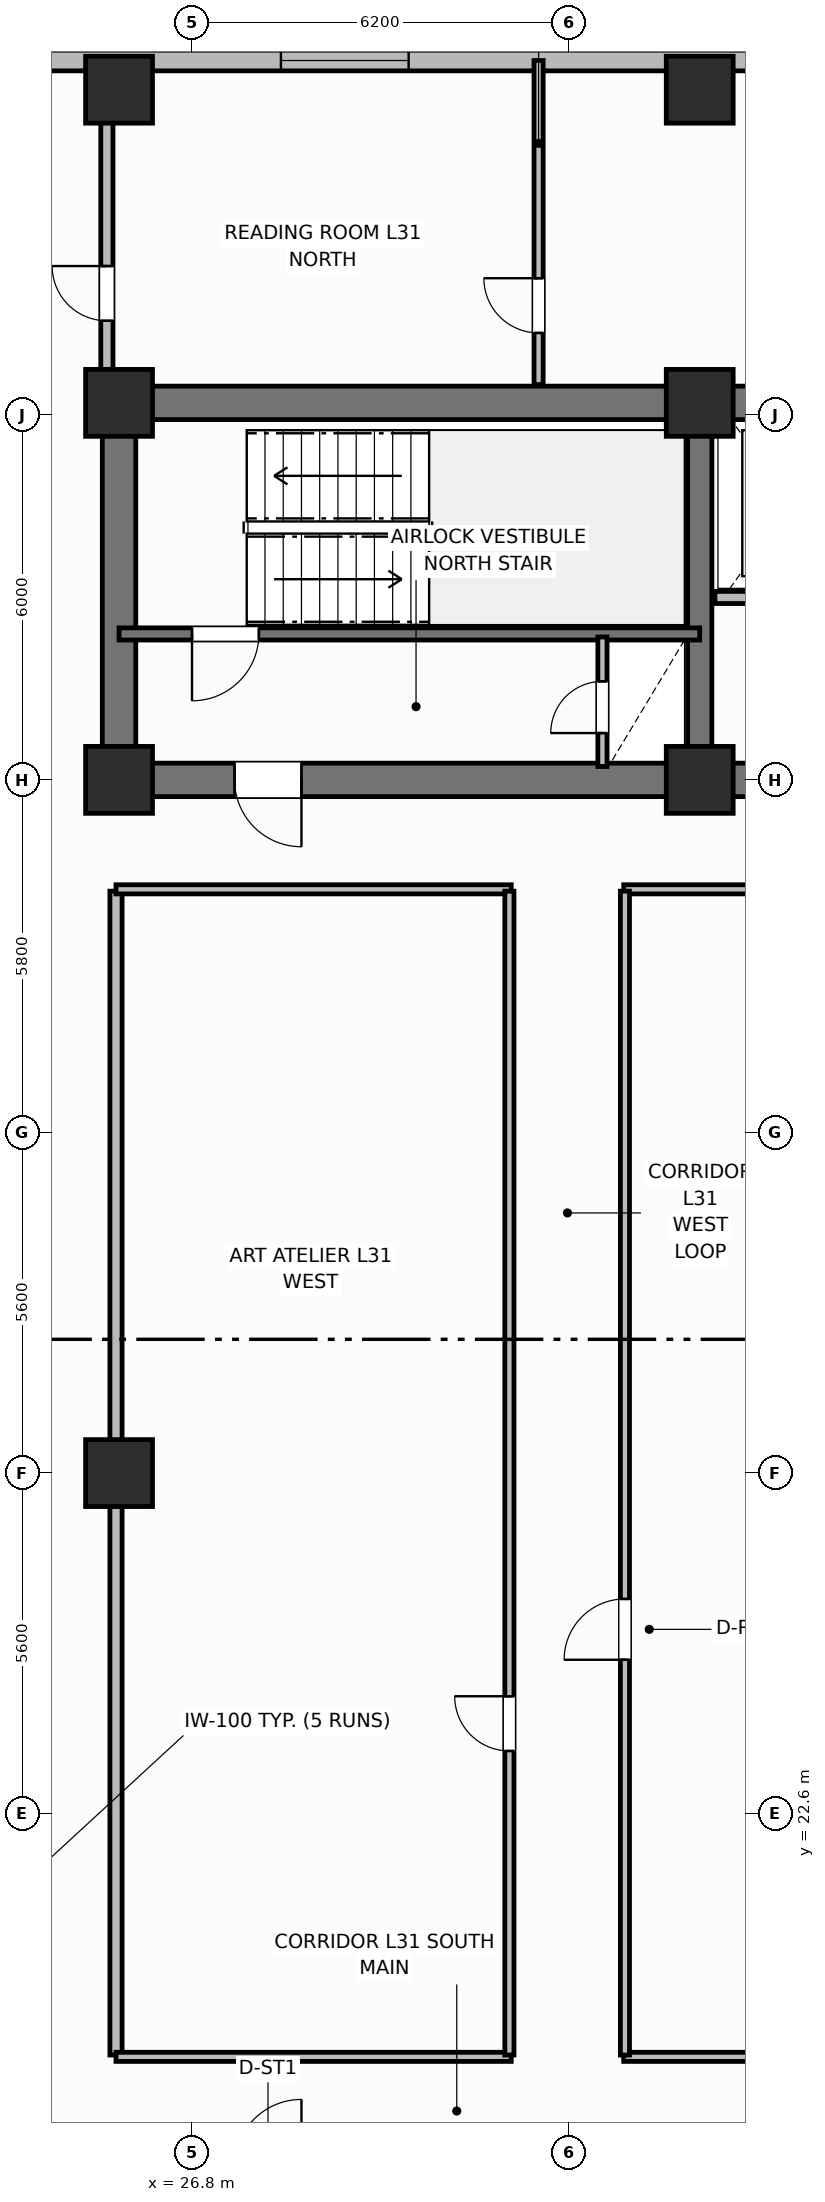
"""IFC4 building model, lengths in metres.
Left out: names, types, materials, properties, quantities, classifications, styles, units other than length and angle.
Written with IfcOpenShell. Run it as: python <this file> out.ifc"""

import sys

from ifc_helpers import new_model, si_unit, direction, frame, frame_2d, origin, origin_2d, place, context, subcontext, project, spatial, rectangle, extrude, element, fill, save


model = new_model("IFC4")
c1 = context("Model", 3, precision=1e-05, world=origin(), true_north=direction((0.0, 1.0)))
c2 = subcontext(c1, "Body", "Model", "MODEL_VIEW")
j1 = project(units=[si_unit("LENGTHUNIT", "METRE"), si_unit("PLANEANGLEUNIT", "RADIAN")], contexts=[c1])
p1 = place(None, origin())
s1 = spatial("IfcSite", under=j1, at=p1, CompositionType="ELEMENT")
p2 = place(p1, origin())
s2 = spatial("IfcBuilding", under=s1, at=p2, CompositionType="ELEMENT")
p3 = place(p2, frame((0.0, 0.0, 125.3)))
s3 = spatial("IfcBuildingStorey", under=s2, at=p3, CompositionType="ELEMENT", Elevation=125.3)
p4 = place(p3, frame((25.6, 45.8, 0.0), z_axis=(0.0, 0.0, 1.0), x_axis=(1.0, 0.0, 0.0)))
e1 = element("IfcWall", 1, at=p4, inside=s3, PredefinedType="SHEAR", context=c2, shape_type="SweptSolid", body=[
    extrude(rectangle(XDim=27.2, YDim=0.55, at=frame_2d((13.6, 0.0))), origin(), (0.0, 0.0, 1.0), 3.7),
])
p5 = place(p3, frame((25.6, 39.875, 0.0), z_axis=(0.0, 0.0, 1.0), x_axis=(0.0, 1.0, 0.0)))
e2 = element("IfcWall", 2, at=p5, inside=s3, PredefinedType="SHEAR", context=c2, shape_type="SweptSolid", body=[
    extrude(rectangle(XDim=5.65, YDim=0.55, at=frame_2d((2.825, 0.0))), origin(), (0.0, 0.0, 1.0), 3.7),
])
p6 = place(p3, frame((52.8, 39.6, 0.0), z_axis=(0.0, 0.0, 1.0), x_axis=(-1.0, 0.0, 0.0)))
e3 = element("IfcWall", 3, at=p6, inside=s3, PredefinedType="SHEAR", context=c2, shape_type="SweptSolid", body=[
    extrude(rectangle(XDim=27.2, YDim=0.55, at=frame_2d((13.6, 0.0))), origin(), (0.0, 0.0, 1.0), 3.7),
])
p7 = place(p6, frame((24.2, 0.0, 0.0)))
e4 = element("IfcOpeningElement", 4, at=p7, cuts=e3, PredefinedType="OPENING", context=c2, shape_type="SweptSolid", body=[
    extrude(rectangle(XDim=1.1, YDim=2.15, at=frame_2d((0.55, 1.075))), frame((0.0, 0.285, 0.0), z_axis=(0.0, -1.0, 0.0), x_axis=(1.0, 0.0, 0.0)), (0.0, 0.0, 1.0), 0.57),
])
p8 = place(p6, frame((15.1, 0.0, 0.0)))
e5 = element("IfcOpeningElement", 5, at=p8, cuts=e3, PredefinedType="OPENING", context=c2, shape_type="SweptSolid", body=[
    extrude(rectangle(XDim=1.2, YDim=2.15, at=frame_2d((0.6, 1.075))), frame((0.0, 0.285, 0.0), z_axis=(0.0, -1.0, 0.0), x_axis=(1.0, 0.0, 0.0)), (0.0, 0.0, 1.0), 0.57),
])
p9 = place(p6, frame((11.3, 0.0, 0.0)))
e6 = element("IfcOpeningElement", 6, at=p9, cuts=e3, PredefinedType="OPENING", context=c2, shape_type="SweptSolid", body=[
    extrude(rectangle(XDim=1.3, YDim=2.2, at=frame_2d((0.65, 1.1))), frame((0.0, 0.285, 0.0), z_axis=(0.0, -1.0, 0.0), x_axis=(1.0, 0.0, 0.0)), (0.0, 0.0, 1.0), 0.57),
])
p10 = place(p6, frame((7.25, 0.0, 0.0)))
e7 = element("IfcOpeningElement", 7, at=p10, cuts=e3, PredefinedType="OPENING", context=c2, shape_type="SweptSolid", body=[
    extrude(rectangle(XDim=0.85, YDim=2.1, at=frame_2d((0.425, 1.05))), frame((0.0, 0.285, 0.0), z_axis=(0.0, -1.0, 0.0), x_axis=(1.0, 0.0, 0.0)), (0.0, 0.0, 1.0), 0.57),
])
p11 = place(p6, frame((3.0, 0.0, 0.0)))
e8 = element("IfcOpeningElement", 8, at=p11, cuts=e3, PredefinedType="OPENING", context=c2, shape_type="SweptSolid", body=[
    extrude(rectangle(XDim=0.9, YDim=2.1, at=frame_2d((0.45, 1.05))), frame((0.0, 0.285, 0.0), z_axis=(0.0, -1.0, 0.0), x_axis=(1.0, 0.0, 0.0)), (0.0, 0.0, 1.0), 0.57),
])
p12 = place(p3, frame((35.15, 39.875, 0.0), z_axis=(0.0, 0.0, 1.0), x_axis=(0.0, 1.0, 0.0)))
e9 = element("IfcWall", 9, at=p12, inside=s3, PredefinedType="SHEAR", context=c2, shape_type="SweptSolid", body=[
    extrude(rectangle(XDim=5.65, YDim=0.4, at=frame_2d((2.825, 0.0))), origin(), (0.0, 0.0, 1.0), 3.7),
])
for number, where, z_axis, x_axis in (
    (10, (25.6, 39.6, 0.0), (0.0, 0.0, 1.0), (1.0, 0.0, 0.0)),
    (11, (25.6, 45.8, 0.0), (0.0, 0.0, 1.0), (1.0, 0.0, 0.0)),
    (12, (35.15, 39.6, 0.0), (0.0, 0.0, 1.0), (1.0, 0.0, 0.0)),
    (13, (35.15, 45.8, 0.0), (0.0, 0.0, 1.0), (1.0, 0.0, 0.0)),
    (14, (25.6, 28.2, 0.0), (0.0, 0.0, 1.0), (1.0, 0.0, 0.0)),
    (15, (25.6, 50.95, 0.0), (0.0, 0.0, 1.0), (1.0, 0.0, 0.0)),
    (16, (35.15, 50.95, 0.0), (0.0, 0.0, 1.0), (1.0, 0.0, 0.0)),
):
    element("IfcColumn", number, at=place(p3, frame(where, z_axis=z_axis, x_axis=x_axis)), inside=s3, PredefinedType="COLUMN", context=c2, shape_type="SweptSolid", body=[
        extrude(rectangle(XDim=1.1, YDim=1.1, at=origin_2d()), origin(), (0.0, 0.0, 1.0), 3.7),
    ])
p13 = place(p3, frame((36.0, 51.43, 0.0), z_axis=(0.0, 0.0, 1.0), x_axis=(-1.0, 0.0, 0.0)))
e17 = element("IfcWall", 17, at=p13, inside=s3, PredefinedType="SOLIDWALL", context=c2, shape_type="SweptSolid", body=[
    extrude(rectangle(XDim=17.4, YDim=0.34, at=frame_2d((8.7, 0.0))), origin(), (0.0, 0.0, 1.0), 2.7),
])
p14 = place(p13, frame((5.637, 0.0, 0.68)))
e18 = element("IfcOpeningElement", 18, at=p14, cuts=e17, PredefinedType="OPENING", context=c2, shape_type="SweptSolid", body=[
    extrude(rectangle(XDim=2.1, YDim=1.9, at=frame_2d((1.05, 0.95))), frame((0.0, 0.18, 0.0), z_axis=(0.0, -1.0, 0.0), x_axis=(1.0, 0.0, 0.0)), (0.0, 0.0, 1.0), 0.36),
])
p15 = place(p13, frame((13.688, 0.0, 0.68)))
e19 = element("IfcOpeningElement", 19, at=p15, cuts=e17, PredefinedType="OPENING", context=c2, shape_type="SweptSolid", body=[
    extrude(rectangle(XDim=2.1, YDim=1.9, at=frame_2d((1.05, 0.95))), frame((0.0, 0.18, 0.0), z_axis=(0.0, -1.0, 0.0), x_axis=(1.0, 0.0, 0.0)), (0.0, 0.0, 1.0), 0.36),
])
p16 = place(p3, frame((35.15, 42.0, 0.0), z_axis=(0.0, 0.0, 1.0), x_axis=(-1.0, 0.0, 0.0)))
e20 = element("IfcWall", 20, at=p16, inside=s3, PredefinedType="SHEAR", context=c2, shape_type="SweptSolid", body=[
    extrude(rectangle(XDim=9.55, YDim=0.2, at=frame_2d((4.775, 0.0))), origin(), (0.0, 0.0, 1.0), 3.7),
])
p17 = place(p16, frame((7.25, 0.0, 0.0)))
e21 = element("IfcOpeningElement", 21, at=p17, cuts=e20, PredefinedType="OPENING", context=c2, shape_type="SweptSolid", body=[
    extrude(rectangle(XDim=1.1, YDim=2.15, at=frame_2d((0.55, 1.075))), frame((0.0, 0.11, 0.0), z_axis=(0.0, -1.0, 0.0), x_axis=(1.0, 0.0, 0.0)), (0.0, 0.0, 1.0), 0.22),
])
p18 = place(p3, frame((33.55, 39.82, 0.0), z_axis=(0.0, 0.0, 1.0), x_axis=(0.0, 1.0, 0.0)))
e22 = element("IfcWall", 22, at=p18, inside=s3, PredefinedType="PARTITIONING", context=c2, shape_type="SweptSolid", body=[
    extrude(rectangle(XDim=2.13, YDim=0.15, at=frame_2d((1.065, 0.0))), origin(), (0.0, 0.0, 1.0), 2.53),
])
p19 = place(p18, frame((0.55, 0.0, 0.0)))
e23 = element("IfcOpeningElement", 23, at=p19, cuts=e22, PredefinedType="OPENING", context=c2, shape_type="SweptSolid", body=[
    extrude(rectangle(XDim=0.85, YDim=2.05, at=frame_2d((0.425, 1.025))), frame((0.0, 0.085, 0.0), z_axis=(0.0, -1.0, 0.0), x_axis=(1.0, 0.0, 0.0)), (0.0, 0.0, 1.0), 0.17),
])
p20 = place(p3, frame((37.95, 42.6, 0.0), z_axis=(0.0, 0.0, 1.0), x_axis=(-1.0, 0.0, 0.0)))
e24 = element("IfcWall", 24, at=p20, inside=s3, PredefinedType="PARTITIONING", context=c2, shape_type="SweptSolid", body=[
    extrude(rectangle(XDim=2.55, YDim=0.2, at=frame_2d((1.275, 0.0))), origin(), (0.0, 0.0, 1.0), 2.3),
])
p21 = place(p20, frame((0.75, 0.0, 0.0)))
e25 = element("IfcOpeningElement", 25, at=p21, cuts=e24, PredefinedType="OPENING", context=c2, shape_type="SweptSolid", body=[
    extrude(rectangle(XDim=1.1, YDim=2.15, at=frame_2d((0.55, 1.075))), frame((0.0, 0.11, 0.0), z_axis=(0.0, -1.0, 0.0), x_axis=(1.0, 0.0, 0.0)), (0.0, 0.0, 1.0), 0.22),
])
p22 = place(p3, frame((25.55, 18.63, 0.0), z_axis=(0.0, 0.0, 1.0), x_axis=(0.0, 1.0, 0.0)))
e26 = element("IfcWall", 26, at=p22, inside=s3, PredefinedType="PARTITIONING", context=c2, shape_type="SweptSolid", body=[
    extrude(rectangle(XDim=19.14, YDim=0.2, at=frame_2d((9.57, 0.0))), origin(), (0.0, 0.0, 1.0), 2.53),
])
for number, where, z_axis, x_axis in (
    (27, (25.55, 18.6, 0.0), (0.0, 0.0, 1.0), (1.0, 0.0, 0.0)),
    (28, (25.55, 37.8, 0.0), (0.0, 0.0, 1.0), (1.0, 0.0, 0.0)),
):
    element("IfcWall", number, at=place(p3, frame(where, z_axis=z_axis, x_axis=x_axis)), inside=s3, PredefinedType="PARTITIONING", context=c2, shape_type="SweptSolid", body=[
        extrude(rectangle(XDim=6.5, YDim=0.15, at=frame_2d((3.25, 0.0))), origin(), (0.0, 0.0, 1.0), 2.53),
    ])
for number, where, z_axis, x_axis in (
    (29, (33.9, 18.6, 0.0), (0.0, 0.0, 1.0), (1.0, 0.0, 0.0)),
    (30, (33.9, 37.8, 0.0), (0.0, 0.0, 1.0), (1.0, 0.0, 0.0)),
):
    element("IfcWall", number, at=place(p3, frame(where, z_axis=z_axis, x_axis=x_axis)), inside=s3, PredefinedType="PARTITIONING", context=c2, shape_type="SweptSolid", body=[
        extrude(rectangle(XDim=10.6, YDim=0.15, at=frame_2d((5.3, 0.0))), origin(), (0.0, 0.0, 1.0), 2.53),
    ])
p23 = place(p3, frame((32.02, 18.63, 0.0), z_axis=(0.0, 0.0, 1.0), x_axis=(0.0, 1.0, 0.0)))
e31 = element("IfcWall", 31, at=p23, inside=s3, PredefinedType="PARTITIONING", context=c2, shape_type="SweptSolid", body=[
    extrude(rectangle(XDim=19.14, YDim=0.15, at=frame_2d((9.57, 0.0))), origin(), (0.0, 0.0, 1.0), 2.53),
])
p24 = place(p23, frame((5.0, 0.0, 0.0)))
e32 = element("IfcOpeningElement", 32, at=p24, cuts=e31, PredefinedType="OPENING", context=c2, shape_type="SweptSolid", body=[
    extrude(rectangle(XDim=0.9, YDim=2.1, at=frame_2d((0.45, 1.05))), frame((0.0, 0.085, 0.0), z_axis=(0.0, -1.0, 0.0), x_axis=(1.0, 0.0, 0.0)), (0.0, 0.0, 1.0), 0.17),
])
p25 = place(p3, frame((33.92, 18.63, 0.0), z_axis=(0.0, 0.0, 1.0), x_axis=(0.0, 1.0, 0.0)))
e33 = element("IfcWall", 33, at=p25, inside=s3, PredefinedType="PARTITIONING", context=c2, shape_type="SweptSolid", body=[
    extrude(rectangle(XDim=19.14, YDim=0.15, at=frame_2d((9.57, 0.0))), origin(), (0.0, 0.0, 1.0), 2.53),
])
p26 = place(p25, frame((6.5, 0.0, 0.0)))
e34 = element("IfcOpeningElement", 34, at=p26, cuts=e33, PredefinedType="OPENING", context=c2, shape_type="SweptSolid", body=[
    extrude(rectangle(XDim=1.0, YDim=2.15, at=frame_2d((0.5, 1.075))), frame((0.0, 0.085, 0.0), z_axis=(0.0, -1.0, 0.0), x_axis=(1.0, 0.0, 0.0)), (0.0, 0.0, 1.0), 0.17),
])
p27 = place(p3, frame((32.5, 46.1, 0.0), z_axis=(0.0, 0.0, 1.0), x_axis=(0.0, 1.0, 0.0)))
e35 = element("IfcWall", 35, at=p27, inside=s3, PredefinedType="PARTITIONING", context=c2, shape_type="SweptSolid", body=[
    extrude(rectangle(XDim=5.33, YDim=0.15, at=frame_2d((2.665, 0.0))), origin(), (0.0, 0.0, 1.0), 2.53),
])
p28 = place(p27, frame((0.85, 0.0, 0.0)))
e36 = element("IfcOpeningElement", 36, at=p28, cuts=e35, PredefinedType="OPENING", context=c2, shape_type="SweptSolid", body=[
    extrude(rectangle(XDim=0.9, YDim=2.1, at=frame_2d((0.45, 1.05))), frame((0.0, 0.085, 0.0), z_axis=(0.0, -1.0, 0.0), x_axis=(1.0, 0.0, 0.0)), (0.0, 0.0, 1.0), 0.17),
])
p29 = place(p3, frame((25.4, 46.1, 0.0), z_axis=(0.0, 0.0, 1.0), x_axis=(0.0, 1.0, 0.0)))
e37 = element("IfcWall", 37, at=p29, inside=s3, PredefinedType="PARTITIONING", context=c2, shape_type="SweptSolid", body=[
    extrude(rectangle(XDim=4.53, YDim=0.2, at=frame_2d((2.265, 0.0))), origin(), (0.0, 0.0, 1.0), 2.53),
])
p30 = place(p29, frame((1.05, 0.0, 0.0)))
e38 = element("IfcOpeningElement", 38, at=p30, cuts=e37, PredefinedType="OPENING", context=c2, shape_type="SweptSolid", body=[
    extrude(rectangle(XDim=0.9, YDim=2.1, at=frame_2d((0.45, 1.05))), frame((0.0, 0.11, 0.0), z_axis=(0.0, -1.0, 0.0), x_axis=(1.0, 0.0, 0.0)), (0.0, 0.0, 1.0), 0.22),
])
p31 = place(p14, origin())
e39 = element("IfcWindow", 39, at=p31, inside=s3, PartitioningType="SINGLE_PANEL", PredefinedType="WINDOW", context=c2, shape_type="SweptSolid", body=[
    extrude(rectangle(XDim=2.1, YDim=1.9, at=frame_2d((1.05, 0.95))), frame((0.0, 0.03, 0.0), z_axis=(0.0, -1.0, 0.0), x_axis=(1.0, 0.0, 0.0)), (0.0, 0.0, 1.0), 0.06),
])
fill(e18, e39)
p32 = place(p17, origin())
e40 = element("IfcDoor", 40, at=p32, inside=s3, OperationType="SINGLE_SWING_RIGHT", PredefinedType="DOOR", context=c2, shape_type="SweptSolid", body=[
    extrude(rectangle(XDim=1.1, YDim=2.15, at=frame_2d((0.55, 1.075))), frame((0.0, 0.025, 0.0), z_axis=(0.0, -1.0, 0.0), x_axis=(1.0, 0.0, 0.0)), (0.0, 0.0, 1.0), 0.05),
])
fill(e21, e40)
p33 = place(p19, origin())
e41 = element("IfcDoor", 41, at=p33, inside=s3, OperationType="SINGLE_SWING_LEFT", PredefinedType="TRAPDOOR", context=c2, shape_type="SweptSolid", body=[
    extrude(rectangle(XDim=0.85, YDim=2.05, at=frame_2d((0.425, 1.025))), frame((0.0, 0.025, 0.0), z_axis=(0.0, -1.0, 0.0), x_axis=(1.0, 0.0, 0.0)), (0.0, 0.0, 1.0), 0.05),
])
fill(e23, e41)
p34 = place(p24, origin())
e42 = element("IfcDoor", 42, at=p34, inside=s3, OperationType="SINGLE_SWING_RIGHT", PredefinedType="DOOR", context=c2, shape_type="SweptSolid", body=[
    extrude(rectangle(XDim=0.9, YDim=2.1, at=frame_2d((0.45, 1.05))), frame((0.0, 0.025, 0.0), z_axis=(0.0, -1.0, 0.0), x_axis=(1.0, 0.0, 0.0)), (0.0, 0.0, 1.0), 0.05),
])
fill(e32, e42)
p35 = place(p26, origin())
e43 = element("IfcDoor", 43, at=p35, inside=s3, OperationType="SINGLE_SWING_LEFT", PredefinedType="DOOR", context=c2, shape_type="SweptSolid", body=[
    extrude(rectangle(XDim=1.0, YDim=2.15, at=frame_2d((0.5, 1.075))), frame((0.0, 0.025, 0.0), z_axis=(0.0, -1.0, 0.0), x_axis=(1.0, 0.0, 0.0)), (0.0, 0.0, 1.0), 0.05),
])
fill(e34, e43)
p36 = place(p28, origin())
e44 = element("IfcDoor", 44, at=p36, inside=s3, OperationType="SINGLE_SWING_RIGHT", PredefinedType="DOOR", context=c2, shape_type="SweptSolid", body=[
    extrude(rectangle(XDim=0.9, YDim=2.1, at=frame_2d((0.45, 1.05))), frame((0.0, 0.025, 0.0), z_axis=(0.0, -1.0, 0.0), x_axis=(1.0, 0.0, 0.0)), (0.0, 0.0, 1.0), 0.05),
])
fill(e36, e44)
p37 = place(p30, origin())
e45 = element("IfcDoor", 45, at=p37, inside=s3, OperationType="SINGLE_SWING_RIGHT", PredefinedType="DOOR", context=c2, shape_type="SweptSolid", body=[
    extrude(rectangle(XDim=0.9, YDim=2.1, at=frame_2d((0.45, 1.05))), frame((0.0, 0.025, 0.0), z_axis=(0.0, -1.0, 0.0), x_axis=(1.0, 0.0, 0.0)), (0.0, 0.0, 1.0), 0.05),
])
fill(e38, e45)
p38 = place(p7, origin())
e46 = element("IfcDoor", 46, at=p38, inside=s3, OperationType="SINGLE_SWING_LEFT", PredefinedType="DOOR", context=c2, shape_type="SweptSolid", body=[
    extrude(rectangle(XDim=1.1, YDim=2.15, at=frame_2d((0.55, 1.075))), frame((0.0, 0.025, 0.0), z_axis=(0.0, -1.0, 0.0), x_axis=(1.0, 0.0, 0.0)), (0.0, 0.0, 1.0), 0.05),
])
fill(e4, e46)
save(model, sys.argv[1])
